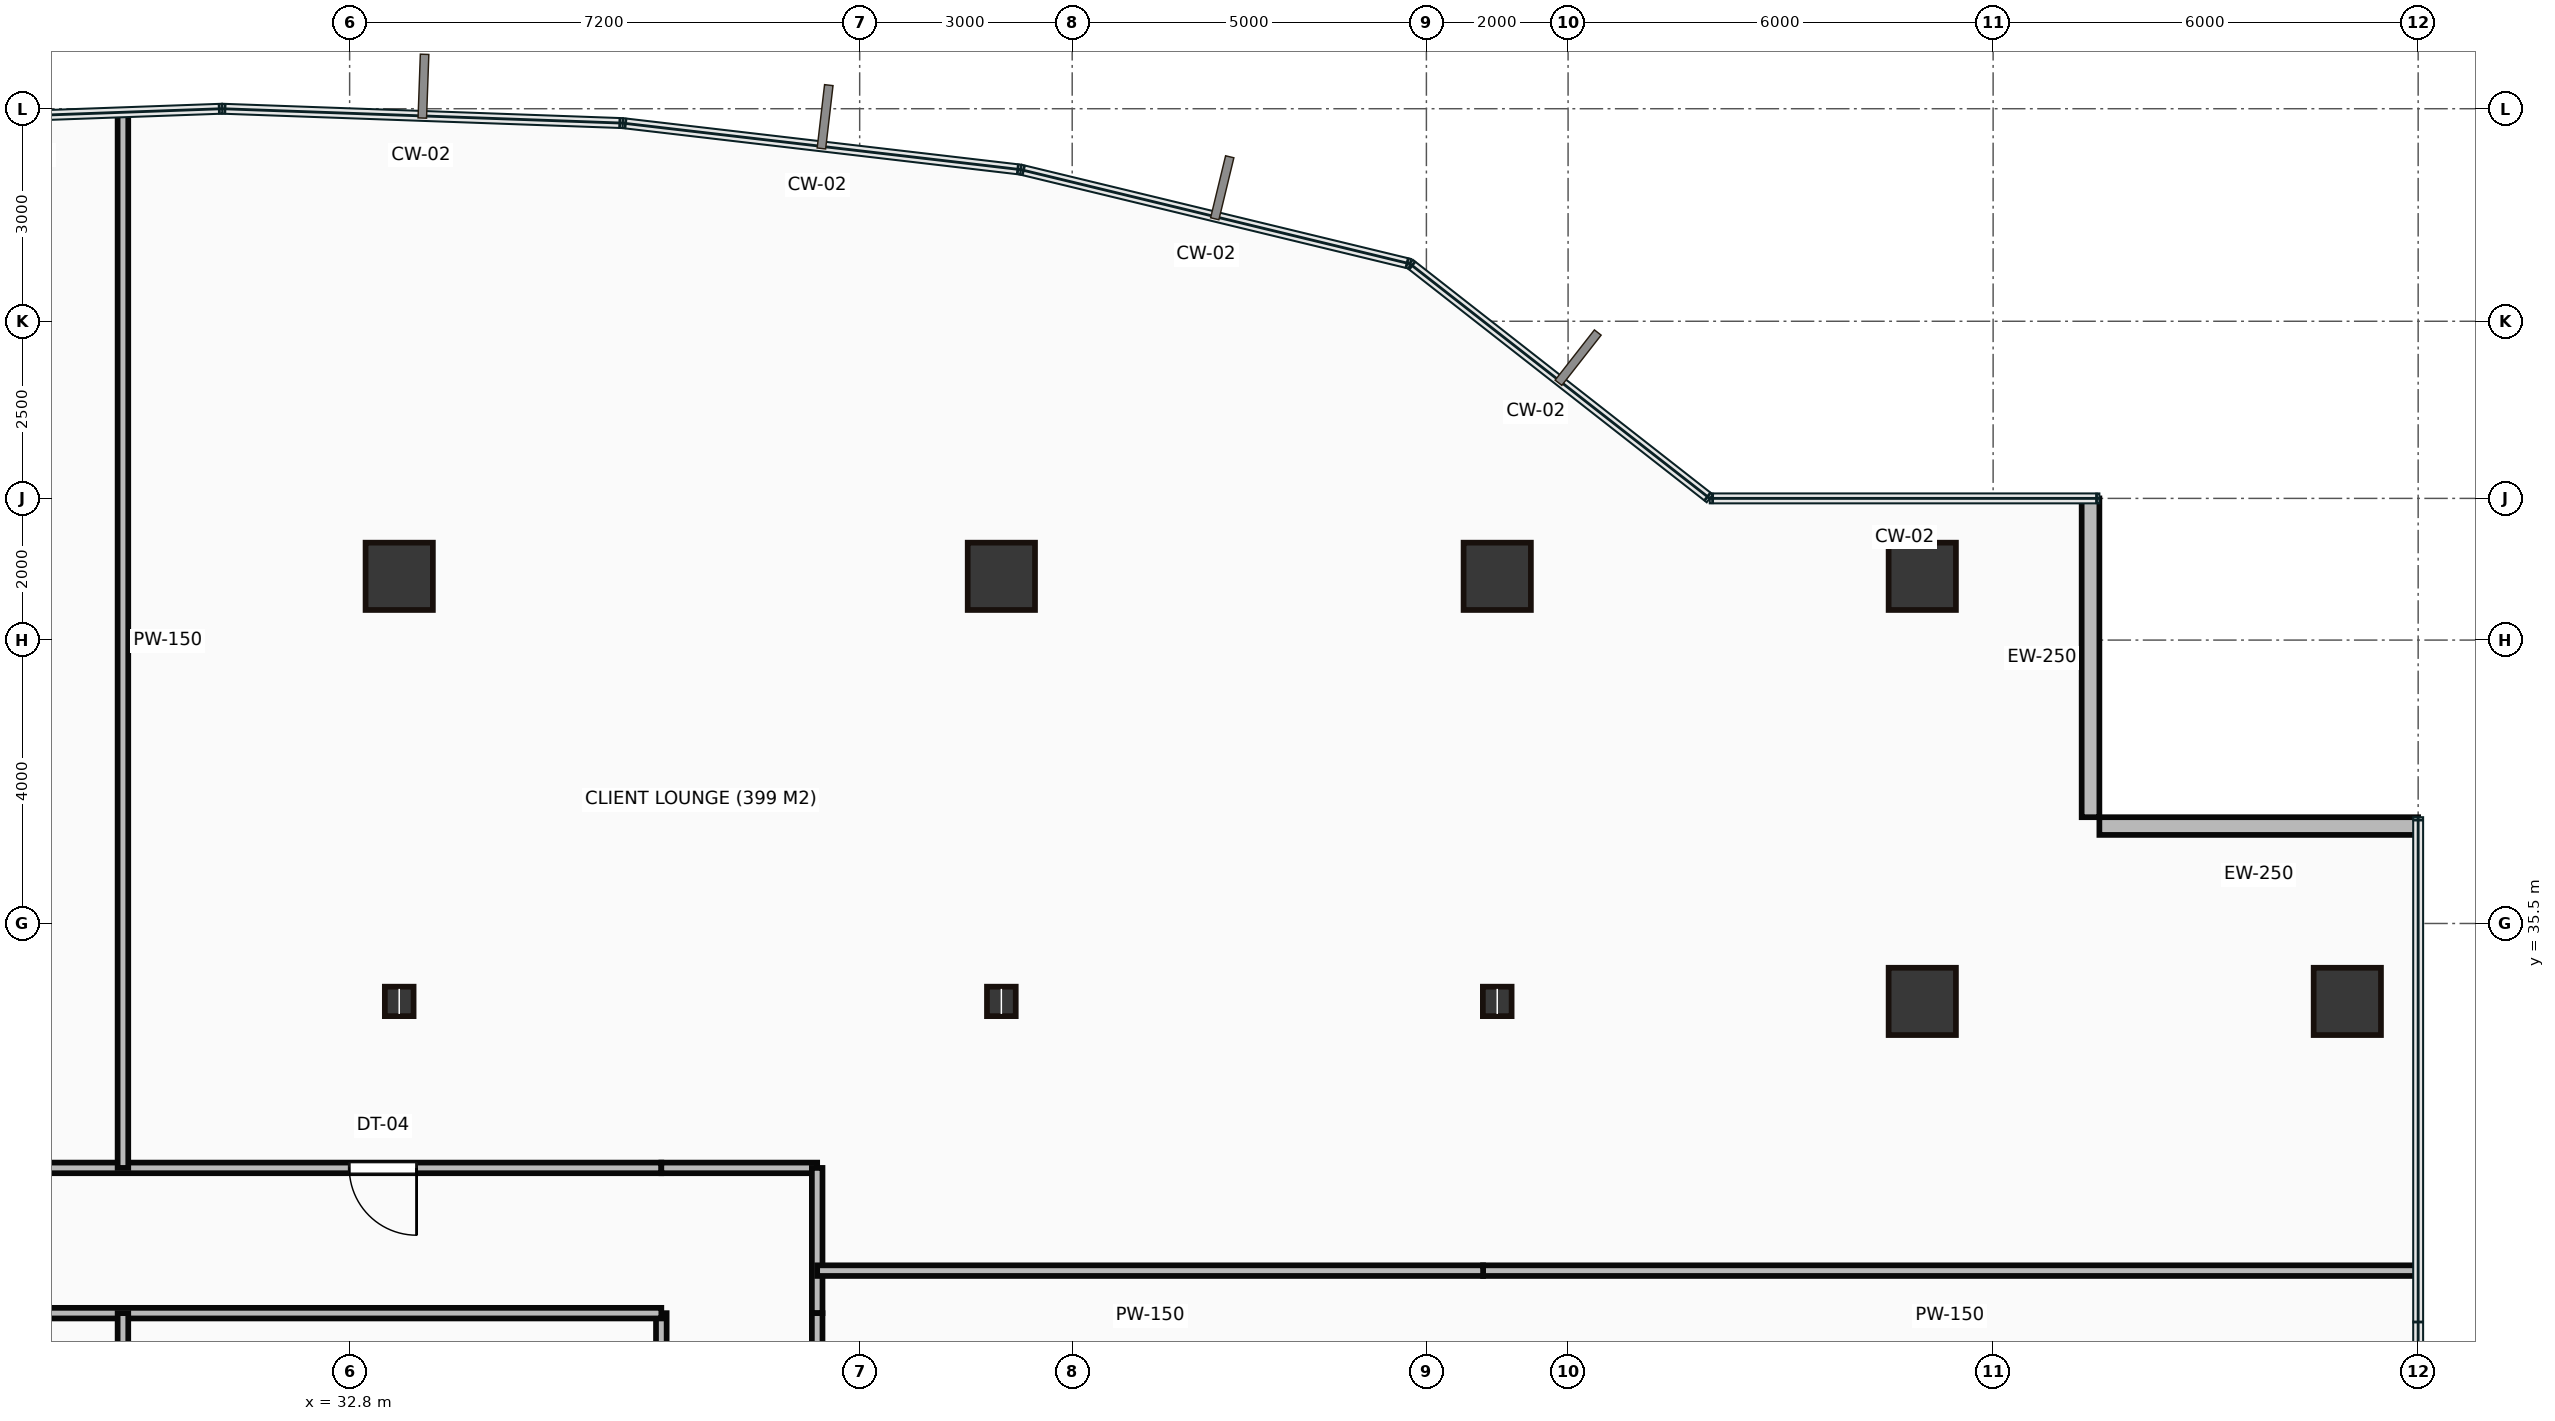
"""IFC4 building model, lengths in metres.
Left out: names, types, materials, properties, quantities, classifications, styles, units other than length and angle.
Written with IfcOpenShell. Run it as: python <this file> out.ifc"""

import sys

from ifc_helpers import new_model, si_unit, direction, frame, frame_2d, origin, origin_2d, place, context, subcontext, project, spatial, rectangle, hollow_rectangle, i_section, extrude, source, transform, mapped, element, fill, save


model = new_model("IFC4")
c1 = context("Model", 3, precision=1e-05, world=origin(), true_north=direction((0.0, 1.0)))
c2 = subcontext(c1, "Body", "Model", "MODEL_VIEW")
j1 = project(units=[si_unit("LENGTHUNIT", "METRE"), si_unit("PLANEANGLEUNIT", "RADIAN")], contexts=[c1])
p1 = place(None, origin())
s1 = spatial("IfcSite", under=j1, at=p1, CompositionType="ELEMENT")
p2 = place(p1, origin())
s2 = spatial("IfcBuilding", under=s1, at=p2, CompositionType="ELEMENT")
p3 = place(p2, frame((0.0, 0.0, 65.35)))
s3 = spatial("IfcBuildingStorey", under=s2, at=p3, CompositionType="ELEMENT", Elevation=65.35)
m1 = source(origin(), c2, "Body", "SweptSolid", [
    extrude(i_section(OverallWidth=0.406, OverallDepth=0.416, WebThickness=0.03, FlangeThickness=0.048, at=origin_2d()), origin(), (0.0, 0.0, 1.0), 3.65),
])
p4 = place(p3, frame((33.5, 34.4, 0.0), z_axis=(0.0, 0.0, 1.0), x_axis=(1.0, 0.0, 0.0)))
e1 = element("IfcColumn", 1, at=p4, inside=s3, PredefinedType="COLUMN", context=c2, shape_type="MappedRepresentation", body=[
    mapped(m1, transform((0.0, 0.0, 0.0))),
])
m2 = source(origin(), c2, "Body", "SweptSolid", [
    extrude(hollow_rectangle(XDim=0.95, YDim=0.95, WallThickness=0.045, at=origin_2d()), origin(), (0.0, 0.0, 1.0), 3.65),
])
p5 = place(p3, frame((33.5, 40.4, 0.0), z_axis=(0.0, 0.0, 1.0), x_axis=(1.0, 0.0, 0.0)))
e2 = element("IfcColumn", 2, at=p5, inside=s3, PredefinedType="COLUMN", context=c2, shape_type="MappedRepresentation", body=[
    mapped(m2, transform((0.0, 0.0, 0.0))),
])
p6 = place(p3, frame((42.0, 34.4, 0.0), z_axis=(0.0, 0.0, 1.0), x_axis=(1.0, 0.0, 0.0)))
e3 = element("IfcColumn", 3, at=p6, inside=s3, PredefinedType="COLUMN", context=c2, shape_type="MappedRepresentation", body=[
    mapped(m1, transform((0.0, 0.0, 0.0))),
])
p7 = place(p3, frame((42.0, 40.4, 0.0), z_axis=(0.0, 0.0, 1.0), x_axis=(1.0, 0.0, 0.0)))
e4 = element("IfcColumn", 4, at=p7, inside=s3, PredefinedType="COLUMN", context=c2, shape_type="MappedRepresentation", body=[
    mapped(m2, transform((0.0, 0.0, 0.0))),
])
p8 = place(p3, frame((49.0, 34.4, 0.0), z_axis=(0.0, 0.0, 1.0), x_axis=(1.0, 0.0, 0.0)))
e5 = element("IfcColumn", 5, at=p8, inside=s3, PredefinedType="COLUMN", context=c2, shape_type="MappedRepresentation", body=[
    mapped(m1, transform((0.0, 0.0, 0.0))),
])
for number, where, z_axis, x_axis in (
    (6, (49.0, 40.4, 0.0), (0.0, 0.0, 1.0), (1.0, 0.0, 0.0)),
    (7, (55.0, 34.4, 0.0), (0.0, 0.0, 1.0), (1.0, 0.0, 0.0)),
    (8, (55.0, 40.4, 0.0), (0.0, 0.0, 1.0), (1.0, 0.0, 0.0)),
    (9, (61.0, 34.4, 0.0), (0.0, 0.0, 1.0), (1.0, 0.0, 0.0)),
):
    element("IfcColumn", number, at=place(p3, frame(where, z_axis=z_axis, x_axis=x_axis)), inside=s3, PredefinedType="COLUMN", context=c2, shape_type="MappedRepresentation", body=[
        mapped(m2, transform((0.0, 0.0, 0.0))),
    ])
m3 = source(origin(), c2, "Body", "SweptSolid", [
    extrude(rectangle(XDim=4.5, YDim=0.25, at=frame_2d((2.25, 0.0))), origin(), (0.0, 0.0, 1.0), 3.4),
])
for number, where, z_axis, x_axis in (
    (10, (62.0, 36.875, 0.0), (0.0, 0.0, 1.0), (-1.0, 0.0, 0.0)),
    (11, (57.375, 37.0, 0.0), (0.0, 0.0, 1.0), (0.0, 1.0, 0.0)),
):
    element("IfcWall", number, at=place(p3, frame(where, z_axis=z_axis, x_axis=x_axis)), inside=s3, PredefinedType="STANDARD", context=c2, shape_type="MappedRepresentation", body=[
        mapped(m3, transform((0.0, 0.0, 0.0))),
    ])
m4 = source(origin(), c2, "Body", "SweptSolid", [
    extrude(rectangle(XDim=31.6, YDim=0.15, at=frame_2d((15.8, 0.0))), origin(), (0.0, 0.0, 1.0), 3.4),
])
p9 = place(p3, frame((5.6, 32.05, 0.0), z_axis=(0.0, 0.0, 1.0), x_axis=(1.0, 0.0, 0.0)))
e12 = element("IfcWall", 12, at=p9, inside=s3, PredefinedType="PARTITIONING", context=c2, shape_type="MappedRepresentation", body=[
    mapped(m4, transform((0.0, 0.0, 0.0))),
])
p10 = place(p9, frame((2.855, 0.0, 0.0)))
e13 = element("IfcOpeningElement", 13, at=p10, cuts=e12, PredefinedType="OPENING", context=c2, shape_type="SweptSolid", body=[
    extrude(rectangle(XDim=0.95, YDim=2.15, at=frame_2d((0.475, 1.075))), frame((0.0, 0.085, 0.0), z_axis=(0.0, -1.0, 0.0), x_axis=(1.0, 0.0, 0.0)), (0.0, 0.0, 1.0), 0.17),
])
p11 = place(p9, frame((10.125, 0.0, 0.0)))
e14 = element("IfcOpeningElement", 14, at=p11, cuts=e12, PredefinedType="OPENING", context=c2, shape_type="SweptSolid", body=[
    extrude(rectangle(XDim=0.95, YDim=2.15, at=frame_2d((0.475, 1.075))), frame((0.0, 0.085, 0.0), z_axis=(0.0, -1.0, 0.0), x_axis=(1.0, 0.0, 0.0)), (0.0, 0.0, 1.0), 0.17),
])
p12 = place(p9, frame((18.925, 0.0, 0.0)))
e15 = element("IfcOpeningElement", 15, at=p12, cuts=e12, PredefinedType="OPENING", context=c2, shape_type="SweptSolid", body=[
    extrude(rectangle(XDim=0.95, YDim=2.15, at=frame_2d((0.475, 1.075))), frame((0.0, 0.085, 0.0), z_axis=(0.0, -1.0, 0.0), x_axis=(1.0, 0.0, 0.0)), (0.0, 0.0, 1.0), 0.17),
])
p13 = place(p9, frame((27.195, 0.0, 0.0)))
e16 = element("IfcOpeningElement", 16, at=p13, cuts=e12, PredefinedType="OPENING", context=c2, shape_type="SweptSolid", body=[
    extrude(rectangle(XDim=0.95, YDim=2.15, at=frame_2d((0.475, 1.075))), frame((0.0, 0.085, 0.0), z_axis=(0.0, -1.0, 0.0), x_axis=(1.0, 0.0, 0.0)), (0.0, 0.0, 1.0), 0.17),
])
m5 = source(origin(), c2, "Body", "SweptSolid", [
    extrude(rectangle(XDim=2.2, YDim=0.15, at=frame_2d((1.1, 0.0))), origin(), (0.0, 0.0, 1.0), 3.4),
])
p14 = place(p3, frame((37.2, 32.05, 0.0), z_axis=(0.0, 0.0, 1.0), x_axis=(1.0, 0.0, 0.0)))
e17 = element("IfcWall", 17, at=p14, inside=s3, PredefinedType="PARTITIONING", context=c2, shape_type="MappedRepresentation", body=[
    mapped(m5, transform((0.0, 0.0, 0.0))),
])
m6 = source(origin(), c2, "Body", "SweptSolid", [
    extrude(rectangle(XDim=2.05, YDim=0.15, at=frame_2d((1.025, 0.0))), origin(), (0.0, 0.0, 1.0), 3.4),
])
p15 = place(p3, frame((39.4, 32.05, 0.0), z_axis=(0.0, 0.0, 1.0), x_axis=(0.0, -1.0, 0.0)))
e18 = element("IfcWall", 18, at=p15, inside=s3, PredefinedType="PARTITIONING", context=c2, shape_type="MappedRepresentation", body=[
    mapped(m6, transform((0.0, 0.0, 0.0))),
])
m7 = source(origin(), c2, "Body", "SweptSolid", [
    extrude(rectangle(XDim=13.75, YDim=0.15, at=frame_2d((6.875, 0.0))), origin(), (0.0, 0.0, 1.0), 3.4),
])
p16 = place(p3, frame((39.4, 30.0, 0.0), z_axis=(0.0, 0.0, 1.0), x_axis=(0.0, -1.0, 0.0)))
e19 = element("IfcWall", 19, at=p16, inside=s3, PredefinedType="PARTITIONING", context=c2, shape_type="MappedRepresentation", body=[
    mapped(m7, transform((0.0, 0.0, 0.0))),
])
p17 = place(p16, frame((6.4, 0.0, 0.0)))
e20 = element("IfcOpeningElement", 20, at=p17, cuts=e19, PredefinedType="OPENING", context=c2, shape_type="SweptSolid", body=[
    extrude(rectangle(XDim=0.95, YDim=2.15, at=frame_2d((0.475, 1.075))), frame((0.0, 0.085, 0.0), z_axis=(0.0, -1.0, 0.0), x_axis=(1.0, 0.0, 0.0)), (0.0, 0.0, 1.0), 0.17),
])
p18 = place(p3, frame((37.2, 16.25, 0.0), z_axis=(0.0, 0.0, 1.0), x_axis=(0.0, 1.0, 0.0)))
e21 = element("IfcWall", 21, at=p18, inside=s3, PredefinedType="PARTITIONING", context=c2, shape_type="MappedRepresentation", body=[
    mapped(m7, transform((0.0, 0.0, 0.0))),
])
p19 = place(p18, frame((6.4, 0.0, 0.0)))
e22 = element("IfcOpeningElement", 22, at=p19, cuts=e21, PredefinedType="OPENING", context=c2, shape_type="SweptSolid", body=[
    extrude(rectangle(XDim=0.95, YDim=2.15, at=frame_2d((0.475, 1.075))), frame((0.0, 0.085, 0.0), z_axis=(0.0, -1.0, 0.0), x_axis=(1.0, 0.0, 0.0)), (0.0, 0.0, 1.0), 0.17),
])
m8 = source(origin(), c2, "Body", "SweptSolid", [
    extrude(rectangle(XDim=31.6, YDim=0.15, at=frame_2d((15.8, 0.0))), origin(), (0.0, 0.0, 1.0), 2.978),
])
p20 = place(p3, frame((37.2, 30.0, 0.0), z_axis=(0.0, 0.0, 1.0), x_axis=(-1.0, 0.0, 0.0)))
e23 = element("IfcWall", 23, at=p20, inside=s3, PredefinedType="PARTITIONING", context=c2, shape_type="MappedRepresentation", body=[
    mapped(m8, transform((0.0, 0.0, 0.0))),
])
p21 = place(p3, frame((29.6, 30.0, 0.0), z_axis=(0.0, 0.0, 1.0), x_axis=(0.0, -1.0, 0.0)))
e24 = element("IfcWall", 24, at=p21, inside=s3, PredefinedType="PARTITIONING", context=c2, shape_type="MappedRepresentation", body=[
    mapped(m7, transform((0.0, 0.0, 0.0))),
])
m9 = source(origin(), c2, "Body", "SweptSolid", [
    extrude(rectangle(XDim=14.88, YDim=0.15, at=frame_2d((7.44, 0.0))), origin(), (0.0, 0.0, 1.0), 3.4),
])
p22 = place(p3, frame((29.6, 46.93, 0.0), z_axis=(0.0, 0.0, 1.0), x_axis=(0.0, -1.0, 0.0)))
e25 = element("IfcWall", 25, at=p22, inside=s3, PredefinedType="PARTITIONING", context=c2, shape_type="MappedRepresentation", body=[
    mapped(m9, transform((0.0, 0.0, 0.0))),
])
m10 = source(origin(), c2, "Body", "SweptSolid", [
    extrude(rectangle(XDim=13.18, YDim=0.15, at=frame_2d((6.59, 0.0))), origin(), (0.0, 0.0, 1.0), 3.4),
])
p23 = place(p3, frame((61.98, 30.6, 0.0), z_axis=(0.0, 0.0, 1.0), x_axis=(-1.0, 0.0, 0.0)))
e26 = element("IfcWall", 26, at=p23, inside=s3, PredefinedType="PARTITIONING", context=c2, shape_type="MappedRepresentation", body=[
    mapped(m10, transform((0.0, 0.0, 0.0))),
])
m11 = source(origin(), c2, "Body", "SweptSolid", [
    extrude(rectangle(XDim=9.4, YDim=0.15, at=frame_2d((4.7, 0.0))), origin(), (0.0, 0.0, 1.0), 3.4),
])
p24 = place(p3, frame((48.8, 30.6, 0.0), z_axis=(0.0, 0.0, 1.0), x_axis=(-1.0, 0.0, 0.0)))
e27 = element("IfcWall", 27, at=p24, inside=s3, PredefinedType="PARTITIONING", context=c2, shape_type="MappedRepresentation", body=[
    mapped(m11, transform((0.0, 0.0, 0.0))),
])
m12 = source(origin(), c2, "Body", "SweptSolid", [
    extrude(rectangle(XDim=0.95, YDim=2.15, at=frame_2d((0.475, 1.075))), frame((0.0, 0.025, 0.0), z_axis=(0.0, -1.0, 0.0), x_axis=(1.0, 0.0, 0.0)), (0.0, 0.0, 1.0), 0.05),
])
p25 = place(p13, origin())
e28 = element("IfcDoor", 28, at=p25, inside=s3, OperationType="SINGLE_SWING_RIGHT", PredefinedType="DOOR", context=c2, shape_type="MappedRepresentation", body=[
    mapped(m12, transform((0.0, 0.0, 0.0))),
])
fill(e16, e28)
save(model, sys.argv[1])
